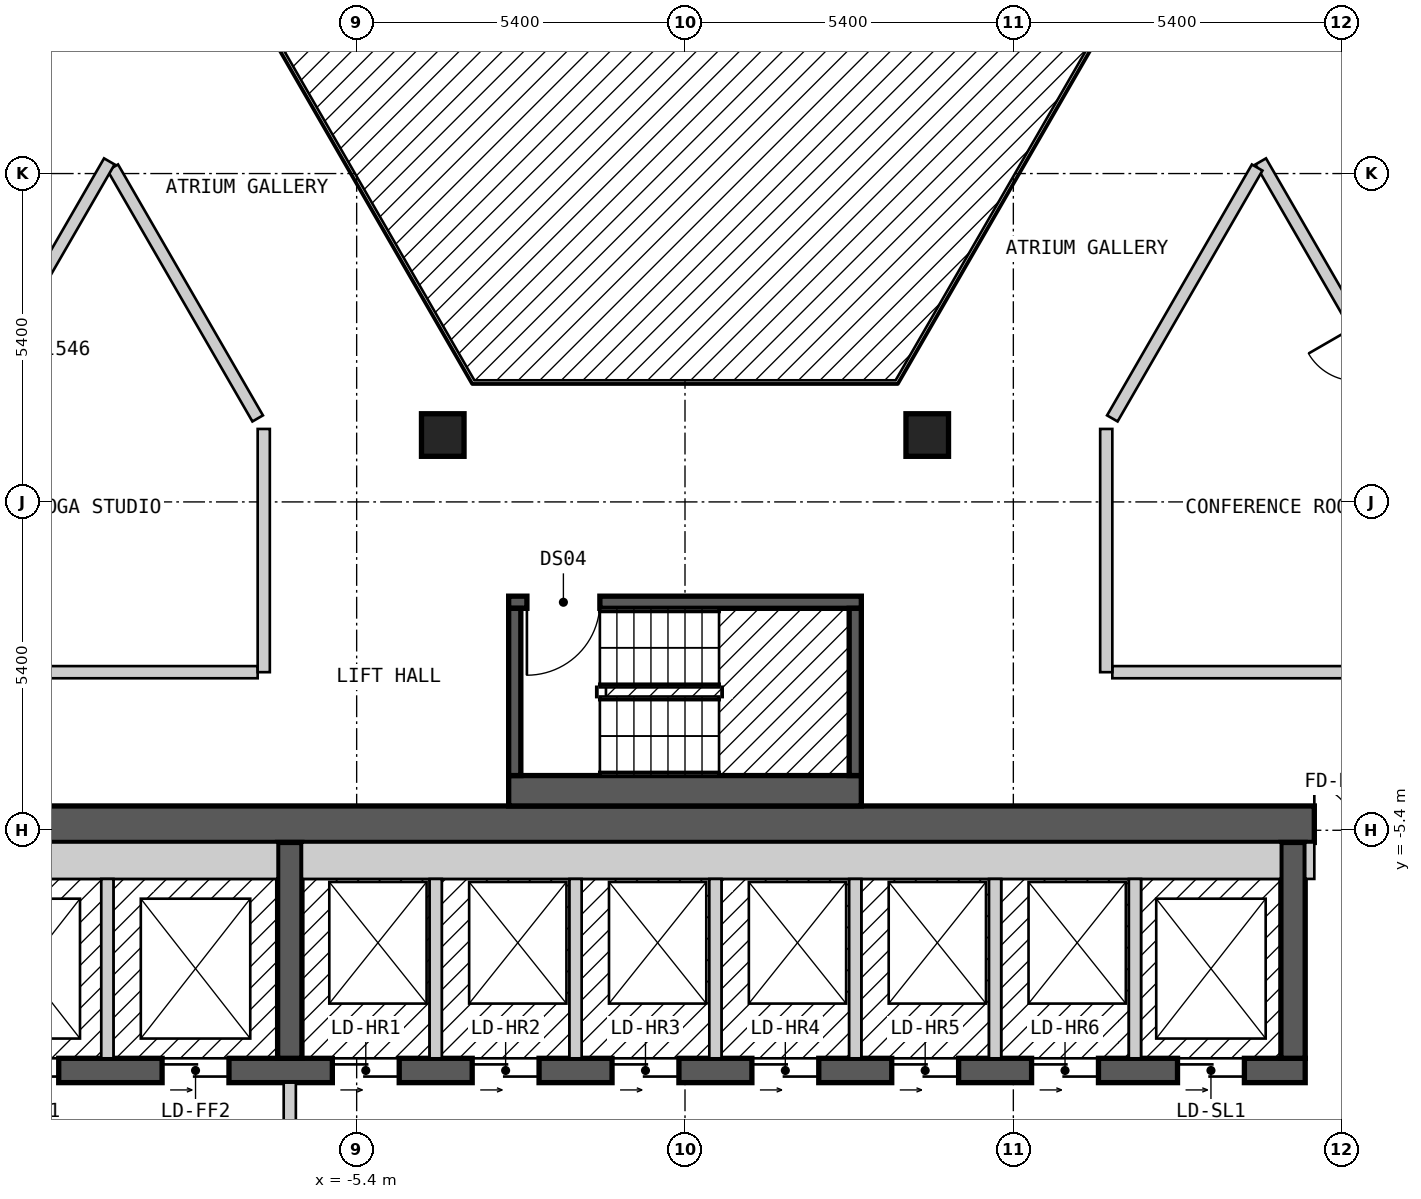
"""IFC4 building model, lengths in metres.
Left out: names, types, materials, properties, quantities, classifications, styles, units other than length and angle.
Written with IfcOpenShell. Run it as: python <this file> out.ifc"""

import sys

from ifc_helpers import new_model, si_unit, direction, frame, frame_2d, origin, origin_2d, place, context, subcontext, project, spatial, rectangle, extrude, element, fill, save


model = new_model("IFC4")
c1 = context("Model", 3, precision=1e-05, world=origin(), true_north=direction((0.0, 1.0)))
c2 = subcontext(c1, "Body", "Model", "MODEL_VIEW")
j1 = project(units=[si_unit("LENGTHUNIT", "METRE"), si_unit("PLANEANGLEUNIT", "RADIAN")], contexts=[c1])
p1 = place(None, origin())
s1 = spatial("IfcSite", under=j1, at=p1, CompositionType="ELEMENT")
p2 = place(p1, origin())
s2 = spatial("IfcBuilding", under=s1, at=p2, CompositionType="ELEMENT")
p3 = place(p2, frame((0.0, 0.0, 190.2)))
s3 = spatial("IfcBuildingStorey", under=s2, at=p3, CompositionType="ELEMENT", Elevation=190.2)
for number, where, z_axis, x_axis in (
    (1, (3.984, 1.1, 0.0), (0.0, 0.0, 1.0), (1.0, 0.0, 0.0)),
    (2, (-3.984, 1.1, 0.0), (0.0, 0.0, 1.0), (1.0, 0.0, 0.0)),
):
    element("IfcColumn", number, at=place(p3, frame(where, z_axis=z_axis, x_axis=x_axis)), inside=s3, PredefinedType="COLUMN", context=c2, shape_type="SweptSolid", body=[
        extrude(rectangle(XDim=0.7, YDim=0.7, at=origin_2d()), origin(), (0.0, 0.0, 1.0), 3.0),
    ])
p4 = place(p3, frame((-13.3, -5.3, 0.0), z_axis=(0.0, 0.0, 1.0), x_axis=(1.0, 0.0, 0.0)))
e3 = element("IfcWall", 3, at=p4, inside=s3, PredefinedType="SHEAR", context=c2, shape_type="SweptSolid", body=[
    extrude(rectangle(XDim=26.6, YDim=0.6, at=frame_2d((13.3, 0.0))), origin(), (0.0, 0.0, 1.0), 2.7),
])
p5 = place(p4, frame((23.65, 0.0, 0.0)))
e4 = element("IfcOpeningElement", 4, at=p5, cuts=e3, PredefinedType="OPENING", context=c2, shape_type="SweptSolid", body=[
    extrude(rectangle(XDim=1.2, YDim=2.1, at=frame_2d((0.6, 1.05))), frame((0.0, 0.31, 0.0), z_axis=(0.0, -1.0, 0.0), x_axis=(1.0, 0.0, 0.0)), (0.0, 0.0, 1.0), 0.62),
])
p6 = place(p3, frame((-12.7, -9.35, 0.0), z_axis=(0.0, 0.0, 1.0), x_axis=(1.0, 0.0, 0.0)))
e5 = element("IfcWall", 5, at=p6, inside=s3, PredefinedType="SHEAR", context=c2, shape_type="SweptSolid", body=[
    extrude(rectangle(XDim=22.9, YDim=0.4, at=frame_2d((11.45, 0.0))), origin(), (0.0, 0.0, 1.0), 2.7),
])
p7 = place(p6, frame((1.3, 0.0, 0.0)))
e6 = element("IfcOpeningElement", 6, at=p7, cuts=e5, PredefinedType="OPENING", context=c2, shape_type="SweptSolid", body=[
    extrude(rectangle(XDim=1.1, YDim=2.1, at=frame_2d((0.55, 1.05))), frame((0.0, 0.21, 0.0), z_axis=(0.0, -1.0, 0.0), x_axis=(1.0, 0.0, 0.0)), (0.0, 0.0, 1.0), 0.42),
])
p8 = place(p6, frame((4.1, 0.0, 0.0)))
e7 = element("IfcOpeningElement", 7, at=p8, cuts=e5, PredefinedType="OPENING", context=c2, shape_type="SweptSolid", body=[
    extrude(rectangle(XDim=1.1, YDim=2.1, at=frame_2d((0.55, 1.05))), frame((0.0, 0.21, 0.0), z_axis=(0.0, -1.0, 0.0), x_axis=(1.0, 0.0, 0.0)), (0.0, 0.0, 1.0), 0.42),
])
p9 = place(p6, frame((6.9, 0.0, 0.0)))
e8 = element("IfcOpeningElement", 8, at=p9, cuts=e5, PredefinedType="OPENING", context=c2, shape_type="SweptSolid", body=[
    extrude(rectangle(XDim=1.1, YDim=2.1, at=frame_2d((0.55, 1.05))), frame((0.0, 0.21, 0.0), z_axis=(0.0, -1.0, 0.0), x_axis=(1.0, 0.0, 0.0)), (0.0, 0.0, 1.0), 0.42),
])
p10 = place(p6, frame((9.2, 0.0, 0.0)))
e9 = element("IfcOpeningElement", 9, at=p10, cuts=e5, PredefinedType="OPENING", context=c2, shape_type="SweptSolid", body=[
    extrude(rectangle(XDim=1.1, YDim=2.1, at=frame_2d((0.55, 1.05))), frame((0.0, 0.21, 0.0), z_axis=(0.0, -1.0, 0.0), x_axis=(1.0, 0.0, 0.0)), (0.0, 0.0, 1.0), 0.42),
])
p11 = place(p6, frame((11.5, 0.0, 0.0)))
e10 = element("IfcOpeningElement", 10, at=p11, cuts=e5, PredefinedType="OPENING", context=c2, shape_type="SweptSolid", body=[
    extrude(rectangle(XDim=1.1, YDim=2.1, at=frame_2d((0.55, 1.05))), frame((0.0, 0.21, 0.0), z_axis=(0.0, -1.0, 0.0), x_axis=(1.0, 0.0, 0.0)), (0.0, 0.0, 1.0), 0.42),
])
p12 = place(p6, frame((13.8, 0.0, 0.0)))
e11 = element("IfcOpeningElement", 11, at=p12, cuts=e5, PredefinedType="OPENING", context=c2, shape_type="SweptSolid", body=[
    extrude(rectangle(XDim=1.1, YDim=2.1, at=frame_2d((0.55, 1.05))), frame((0.0, 0.21, 0.0), z_axis=(0.0, -1.0, 0.0), x_axis=(1.0, 0.0, 0.0)), (0.0, 0.0, 1.0), 0.42),
])
p13 = place(p6, frame((16.1, 0.0, 0.0)))
e12 = element("IfcOpeningElement", 12, at=p13, cuts=e5, PredefinedType="OPENING", context=c2, shape_type="SweptSolid", body=[
    extrude(rectangle(XDim=1.1, YDim=2.1, at=frame_2d((0.55, 1.05))), frame((0.0, 0.21, 0.0), z_axis=(0.0, -1.0, 0.0), x_axis=(1.0, 0.0, 0.0)), (0.0, 0.0, 1.0), 0.42),
])
p14 = place(p6, frame((18.4, 0.0, 0.0)))
e13 = element("IfcOpeningElement", 13, at=p14, cuts=e5, PredefinedType="OPENING", context=c2, shape_type="SweptSolid", body=[
    extrude(rectangle(XDim=1.1, YDim=2.1, at=frame_2d((0.55, 1.05))), frame((0.0, 0.21, 0.0), z_axis=(0.0, -1.0, 0.0), x_axis=(1.0, 0.0, 0.0)), (0.0, 0.0, 1.0), 0.42),
])
p15 = place(p6, frame((20.8, 0.0, 0.0)))
e14 = element("IfcOpeningElement", 14, at=p15, cuts=e5, PredefinedType="OPENING", context=c2, shape_type="SweptSolid", body=[
    extrude(rectangle(XDim=1.1, YDim=2.1, at=frame_2d((0.55, 1.05))), frame((0.0, 0.21, 0.0), z_axis=(0.0, -1.0, 0.0), x_axis=(1.0, 0.0, 0.0)), (0.0, 0.0, 1.0), 0.42),
])
for number, where, z_axis, x_axis in (
    (15, (-6.5, -9.15, 0.0), (0.0, 0.0, 1.0), (0.0, 1.0, 0.0)),
    (16, (10.0, -9.15, 0.0), (0.0, 0.0, 1.0), (0.0, 1.0, 0.0)),
):
    element("IfcWall", number, at=place(p3, frame(where, z_axis=z_axis, x_axis=x_axis)), inside=s3, PredefinedType="SHEAR", context=c2, shape_type="SweptSolid", body=[
        extrude(rectangle(XDim=3.55, YDim=0.4, at=frame_2d((1.775, 0.0))), origin(), (0.0, 0.0, 1.0), 2.7),
    ])
p16 = place(p3, frame((-2.9, -4.75, 0.0), z_axis=(0.0, 0.0, 1.0), x_axis=(1.0, 0.0, 0.0)))
e17 = element("IfcWall", 17, at=p16, inside=s3, PredefinedType="SOLIDWALL", context=c2, shape_type="SweptSolid", body=[
    extrude(rectangle(XDim=5.8, YDim=0.5, at=frame_2d((2.9, 0.0))), origin(), (0.0, 0.0, 1.0), 2.7),
])
p17 = place(p3, frame((-2.9, -1.65, 0.0), z_axis=(0.0, 0.0, 1.0), x_axis=(1.0, 0.0, 0.0)))
e18 = element("IfcWall", 18, at=p17, inside=s3, PredefinedType="SOLIDWALL", context=c2, shape_type="SweptSolid", body=[
    extrude(rectangle(XDim=5.8, YDim=0.2, at=frame_2d((2.9, 0.0))), origin(), (0.0, 0.0, 1.0), 2.7),
])
p18 = place(p17, frame((0.3, 0.0, 0.0)))
e19 = element("IfcOpeningElement", 19, at=p18, cuts=e18, PredefinedType="OPENING", context=c2, shape_type="SweptSolid", body=[
    extrude(rectangle(XDim=1.2, YDim=2.1, at=frame_2d((0.6, 1.05))), frame((0.0, 0.11, 0.0), z_axis=(0.0, -1.0, 0.0), x_axis=(1.0, 0.0, 0.0)), (0.0, 0.0, 1.0), 0.22),
])
for number, where, z_axis, x_axis in (
    (20, (-2.8, -4.5, 0.0), (0.0, 0.0, 1.0), (0.0, 1.0, 0.0)),
    (21, (2.8, -4.5, 0.0), (0.0, 0.0, 1.0), (0.0, 1.0, 0.0)),
):
    element("IfcWall", number, at=place(p3, frame(where, z_axis=z_axis, x_axis=x_axis)), inside=s3, PredefinedType="SOLIDWALL", context=c2, shape_type="SweptSolid", body=[
        extrude(rectangle(XDim=2.75, YDim=0.2, at=frame_2d((1.375, 0.0))), origin(), (0.0, 0.0, 1.0), 2.7),
    ])
p19 = place(p3, frame((-9.411, 5.5, 0.0), z_axis=(0.0, 0.0, 1.0), x_axis=(0.500018099276, -0.86601495391, 0.0)))
e22 = element("IfcWall", 22, at=p19, inside=s3, PredefinedType="PARTITIONING", context=c2, shape_type="SweptSolid", body=[
    extrude(rectangle(XDim=4.765, YDim=0.2, at=frame_2d((2.383, 0.0))), origin(), (0.0, 0.0, 1.0), 2.7),
])
p20 = place(p3, frame((9.469, 5.6, 0.0), z_axis=(0.0, 0.0, 1.0), x_axis=(0.499964524401, -0.866045884662, 0.0)))
e23 = element("IfcWall", 23, at=p20, inside=s3, PredefinedType="PARTITIONING", context=c2, shape_type="SweptSolid", body=[
    extrude(rectangle(XDim=7.042, YDim=0.2, at=frame_2d((3.521, 0.0))), origin(), (0.0, 0.0, 1.0), 2.7),
])
p21 = place(p20, frame((3.129, 0.0, 0.0)))
e24 = element("IfcOpeningElement", 24, at=p21, cuts=e23, PredefinedType="OPENING", context=c2, shape_type="SweptSolid", body=[
    extrude(rectangle(XDim=0.9, YDim=2.1, at=frame_2d((0.45, 1.05))), frame((0.0, 0.11, 0.0), z_axis=(0.0, -1.0, 0.0), x_axis=(1.0, 0.0, 0.0)), (0.0, 0.0, 1.0), 0.22),
])
p22 = place(p3, frame((10.739, 7.8, 0.0), z_axis=(0.0, 0.0, 1.0), x_axis=(0.500023726918, -0.866011704609, 0.0)))
e25 = element("IfcWall", 25, at=p22, inside=s3, PredefinedType="PARTITIONING", context=c2, shape_type="SweptSolid", body=[
    extrude(rectangle(XDim=9.47, YDim=0.2, at=frame_2d((4.735, 0.0))), origin(), (0.0, 0.0, 1.0), 2.7),
])
p23 = place(p22, frame((8.168, 0.0, 0.0)))
e26 = element("IfcOpeningElement", 26, at=p23, cuts=e25, PredefinedType="OPENING", context=c2, shape_type="SweptSolid", body=[
    extrude(rectangle(XDim=1.0, YDim=2.1, at=frame_2d((0.5, 1.05))), frame((0.0, 0.11, 0.0), z_axis=(0.0, -1.0, 0.0), x_axis=(1.0, 0.0, 0.0)), (0.0, 0.0, 1.0), 0.22),
])
p24 = place(p22, frame((3.578, 0.0, 0.0)))
e27 = element("IfcOpeningElement", 27, at=p24, cuts=e25, PredefinedType="OPENING", context=c2, shape_type="SweptSolid", body=[
    extrude(rectangle(XDim=1.0, YDim=2.1, at=frame_2d((0.5, 1.05))), frame((0.0, 0.11, 0.0), z_axis=(0.0, -1.0, 0.0), x_axis=(1.0, 0.0, 0.0)), (0.0, 0.0, 1.0), 0.22),
])
p25 = place(p3, frame((-11.778, -2.8, 0.0), z_axis=(0.0, 0.0, 1.0), x_axis=(1.0, 0.0, 0.0)))
e28 = element("IfcWall", 28, at=p25, inside=s3, PredefinedType="PARTITIONING", context=c2, shape_type="SweptSolid", body=[
    extrude(rectangle(XDim=4.75, YDim=0.2, at=frame_2d((2.375, 0.0))), origin(), (0.0, 0.0, 1.0), 2.7),
])
p26 = place(p3, frame((7.028, -2.8, 0.0), z_axis=(0.0, 0.0, 1.0), x_axis=(1.0, 0.0, 0.0)))
e29 = element("IfcWall", 29, at=p26, inside=s3, PredefinedType="PARTITIONING", context=c2, shape_type="SweptSolid", body=[
    extrude(rectangle(XDim=4.634, YDim=0.2, at=frame_2d((2.317, 0.0))), origin(), (0.0, 0.0, 1.0), 2.7),
])
p27 = place(p3, frame((7.028, 1.373, 0.0), z_axis=(0.0, 0.0, 1.0), x_axis=(0.499953126767, 0.866052464367, 0.0)))
e30 = element("IfcWall", 30, at=p27, inside=s3, PredefinedType="PARTITIONING", context=c2, shape_type="SweptSolid", body=[
    extrude(rectangle(XDim=4.764, YDim=0.2, at=frame_2d((2.382, 0.0))), origin(), (0.0, 0.0, 1.0), 2.7),
])
p28 = place(p3, frame((-13.048, -0.601, 0.0), z_axis=(0.0, 0.0, 1.0), x_axis=(0.499982180423, 0.866035691677, 0.0)))
e31 = element("IfcWall", 31, at=p28, inside=s3, PredefinedType="PARTITIONING", context=c2, shape_type="SweptSolid", body=[
    extrude(rectangle(XDim=7.16, YDim=0.2, at=frame_2d((3.58, 0.0))), origin(), (0.0, 0.0, 1.0), 2.7),
])
p29 = place(p28, frame((3.13, 0.0, 0.0)))
e32 = element("IfcOpeningElement", 32, at=p29, cuts=e31, PredefinedType="OPENING", context=c2, shape_type="SweptSolid", body=[
    extrude(rectangle(XDim=0.9, YDim=2.1, at=frame_2d((0.45, 1.05))), frame((0.0, 0.11, 0.0), z_axis=(0.0, -1.0, 0.0), x_axis=(1.0, 0.0, 0.0)), (0.0, 0.0, 1.0), 0.22),
])
for number, where, z_axis, x_axis in (
    (33, (6.928, -2.8, 0.0), (0.0, 0.0, 1.0), (0.0, 1.0, 0.0)),
    (34, (-6.928, -2.8, 0.0), (0.0, 0.0, 1.0), (0.0, 1.0, 0.0)),
):
    element("IfcWall", number, at=place(p3, frame(where, z_axis=z_axis, x_axis=x_axis)), inside=s3, PredefinedType="PARTITIONING", context=c2, shape_type="SweptSolid", body=[
        extrude(rectangle(XDim=4.0, YDim=0.2, at=frame_2d((2.0, 0.0))), origin(), (0.0, 0.0, 1.0), 2.7),
    ])
p30 = place(p3, frame((-12.1, -5.9, 0.0), z_axis=(0.0, 0.0, 1.0), x_axis=(1.0, 0.0, 0.0)))
e35 = element("IfcWall", 35, at=p30, inside=s3, PredefinedType="SOLIDWALL", context=c2, shape_type="SweptSolid", body=[
    extrude(rectangle(XDim=5.4, YDim=0.6, at=frame_2d((2.7, 0.0))), origin(), (0.0, 0.0, 1.0), 2.7),
])
p31 = place(p3, frame((-9.5, -9.15, 0.0), z_axis=(0.0, 0.0, 1.0), x_axis=(0.0, 1.0, 0.0)))
e36 = element("IfcWall", 36, at=p31, inside=s3, PredefinedType="SOLIDWALL", context=c2, shape_type="SweptSolid", body=[
    extrude(rectangle(XDim=2.95, YDim=0.2, at=frame_2d((1.475, 0.0))), origin(), (0.0, 0.0, 1.0), 2.7),
])
p32 = place(p3, frame((-6.5, -14.45, 0.0), z_axis=(0.0, 0.0, 1.0), x_axis=(0.0, 1.0, 0.0)))
e37 = element("IfcWall", 37, at=p32, inside=s3, PredefinedType="PARTITIONING", context=c2, shape_type="SweptSolid", body=[
    extrude(rectangle(XDim=4.9, YDim=0.2, at=frame_2d((2.45, 0.0))), origin(), (0.0, 0.0, 1.0), 2.7),
])
p33 = place(p32, frame((3.15, 0.0, 0.0), z_axis=(0.0, 0.0, 1.0), x_axis=(-1.0, 0.0, 0.0)))
e38 = element("IfcOpeningElement", 38, at=p33, cuts=e37, PredefinedType="OPENING", context=c2, shape_type="SweptSolid", body=[
    extrude(rectangle(XDim=1.4, YDim=2.1, at=frame_2d((0.7, 1.05))), frame((0.0, 0.11, 0.0), z_axis=(0.0, -1.0, 0.0), x_axis=(1.0, 0.0, 0.0)), (0.0, 0.0, 1.0), 0.22),
])
p34 = place(p3, frame((-6.3, -5.9, 0.0), z_axis=(0.0, 0.0, 1.0), x_axis=(1.0, 0.0, 0.0)))
e39 = element("IfcWall", 39, at=p34, inside=s3, PredefinedType="SOLIDWALL", context=c2, shape_type="SweptSolid", body=[
    extrude(rectangle(XDim=16.1, YDim=0.6, at=frame_2d((8.05, 0.0))), origin(), (0.0, 0.0, 1.0), 2.7),
])
for number, where, z_axis, x_axis in (
    (40, (-4.1, -9.15, 0.0), (0.0, 0.0, 1.0), (0.0, 1.0, 0.0)),
    (41, (-1.8, -9.15, 0.0), (0.0, 0.0, 1.0), (0.0, 1.0, 0.0)),
    (42, (0.5, -9.15, 0.0), (0.0, 0.0, 1.0), (0.0, 1.0, 0.0)),
    (43, (2.8, -9.15, 0.0), (0.0, 0.0, 1.0), (0.0, 1.0, 0.0)),
    (44, (5.1, -9.15, 0.0), (0.0, 0.0, 1.0), (0.0, 1.0, 0.0)),
    (45, (7.4, -9.15, 0.0), (0.0, 0.0, 1.0), (0.0, 1.0, 0.0)),
):
    element("IfcWall", number, at=place(p3, frame(where, z_axis=z_axis, x_axis=x_axis)), inside=s3, PredefinedType="SOLIDWALL", context=c2, shape_type="SweptSolid", body=[
        extrude(rectangle(XDim=2.95, YDim=0.2, at=frame_2d((1.475, 0.0))), origin(), (0.0, 0.0, 1.0), 2.7),
    ])
p35 = place(p3, frame((10.275, -6.2, 0.0), z_axis=(0.0, 0.0, 1.0), x_axis=(0.0, 1.0, 0.0)))
e46 = element("IfcWall", 46, at=p35, inside=s3, PredefinedType="PARTITIONING", context=c2, shape_type="SweptSolid", body=[
    extrude(rectangle(XDim=0.6, YDim=0.15, at=frame_2d((0.3, 0.0))), origin(), (0.0, 0.0, 1.0), 2.7),
])
p36 = place(p18, origin())
e47 = element("IfcDoor", 47, at=p36, inside=s3, OperationType="SINGLE_SWING_LEFT", PredefinedType="DOOR", context=c2, shape_type="SweptSolid", body=[
    extrude(rectangle(XDim=1.2, YDim=2.1, at=frame_2d((0.6, 1.05))), frame((0.0, 0.025, 0.0), z_axis=(0.0, -1.0, 0.0), x_axis=(1.0, 0.0, 0.0)), (0.0, 0.0, 1.0), 0.05),
])
fill(e19, e47)
p37 = place(p7, origin())
e48 = element("IfcDoor", 48, at=p37, inside=s3, OperationType="DOUBLE_DOOR_SLIDING", PredefinedType="DOOR", context=c2, shape_type="SweptSolid", body=[
    extrude(rectangle(XDim=1.1, YDim=2.1, at=frame_2d((0.55, 1.05))), frame((0.0, 0.025, 0.0), z_axis=(0.0, -1.0, 0.0), x_axis=(1.0, 0.0, 0.0)), (0.0, 0.0, 1.0), 0.05),
])
fill(e6, e48)
p38 = place(p8, origin())
e49 = element("IfcDoor", 49, at=p38, inside=s3, OperationType="DOUBLE_DOOR_SLIDING", PredefinedType="DOOR", context=c2, shape_type="SweptSolid", body=[
    extrude(rectangle(XDim=1.1, YDim=2.1, at=frame_2d((0.55, 1.05))), frame((0.0, 0.025, 0.0), z_axis=(0.0, -1.0, 0.0), x_axis=(1.0, 0.0, 0.0)), (0.0, 0.0, 1.0), 0.05),
])
fill(e7, e49)
p39 = place(p9, origin())
e50 = element("IfcDoor", 50, at=p39, inside=s3, OperationType="DOUBLE_DOOR_SLIDING", PredefinedType="DOOR", context=c2, shape_type="SweptSolid", body=[
    extrude(rectangle(XDim=1.1, YDim=2.1, at=frame_2d((0.55, 1.05))), frame((0.0, 0.025, 0.0), z_axis=(0.0, -1.0, 0.0), x_axis=(1.0, 0.0, 0.0)), (0.0, 0.0, 1.0), 0.05),
])
fill(e8, e50)
p40 = place(p10, origin())
e51 = element("IfcDoor", 51, at=p40, inside=s3, OperationType="DOUBLE_DOOR_SLIDING", PredefinedType="DOOR", context=c2, shape_type="SweptSolid", body=[
    extrude(rectangle(XDim=1.1, YDim=2.1, at=frame_2d((0.55, 1.05))), frame((0.0, 0.025, 0.0), z_axis=(0.0, -1.0, 0.0), x_axis=(1.0, 0.0, 0.0)), (0.0, 0.0, 1.0), 0.05),
])
fill(e9, e51)
p41 = place(p11, origin())
e52 = element("IfcDoor", 52, at=p41, inside=s3, OperationType="DOUBLE_DOOR_SLIDING", PredefinedType="DOOR", context=c2, shape_type="SweptSolid", body=[
    extrude(rectangle(XDim=1.1, YDim=2.1, at=frame_2d((0.55, 1.05))), frame((0.0, 0.025, 0.0), z_axis=(0.0, -1.0, 0.0), x_axis=(1.0, 0.0, 0.0)), (0.0, 0.0, 1.0), 0.05),
])
fill(e10, e52)
p42 = place(p12, origin())
e53 = element("IfcDoor", 53, at=p42, inside=s3, OperationType="DOUBLE_DOOR_SLIDING", PredefinedType="DOOR", context=c2, shape_type="SweptSolid", body=[
    extrude(rectangle(XDim=1.1, YDim=2.1, at=frame_2d((0.55, 1.05))), frame((0.0, 0.025, 0.0), z_axis=(0.0, -1.0, 0.0), x_axis=(1.0, 0.0, 0.0)), (0.0, 0.0, 1.0), 0.05),
])
fill(e11, e53)
p43 = place(p13, origin())
e54 = element("IfcDoor", 54, at=p43, inside=s3, OperationType="DOUBLE_DOOR_SLIDING", PredefinedType="DOOR", context=c2, shape_type="SweptSolid", body=[
    extrude(rectangle(XDim=1.1, YDim=2.1, at=frame_2d((0.55, 1.05))), frame((0.0, 0.025, 0.0), z_axis=(0.0, -1.0, 0.0), x_axis=(1.0, 0.0, 0.0)), (0.0, 0.0, 1.0), 0.05),
])
fill(e12, e54)
p44 = place(p14, origin())
e55 = element("IfcDoor", 55, at=p44, inside=s3, OperationType="DOUBLE_DOOR_SLIDING", PredefinedType="DOOR", context=c2, shape_type="SweptSolid", body=[
    extrude(rectangle(XDim=1.1, YDim=2.1, at=frame_2d((0.55, 1.05))), frame((0.0, 0.025, 0.0), z_axis=(0.0, -1.0, 0.0), x_axis=(1.0, 0.0, 0.0)), (0.0, 0.0, 1.0), 0.05),
])
fill(e13, e55)
p45 = place(p15, origin())
e56 = element("IfcDoor", 56, at=p45, inside=s3, OperationType="DOUBLE_DOOR_SLIDING", PredefinedType="DOOR", context=c2, shape_type="SweptSolid", body=[
    extrude(rectangle(XDim=1.1, YDim=2.1, at=frame_2d((0.55, 1.05))), frame((0.0, 0.025, 0.0), z_axis=(0.0, -1.0, 0.0), x_axis=(1.0, 0.0, 0.0)), (0.0, 0.0, 1.0), 0.05),
])
fill(e14, e56)
p46 = place(p5, origin())
e57 = element("IfcDoor", 57, at=p46, inside=s3, OperationType="DOUBLE_DOOR_SINGLE_SWING", PredefinedType="DOOR", context=c2, shape_type="SweptSolid", body=[
    extrude(rectangle(XDim=1.2, YDim=2.1, at=frame_2d((0.6, 1.05))), frame((0.0, 0.025, 0.0), z_axis=(0.0, -1.0, 0.0), x_axis=(1.0, 0.0, 0.0)), (0.0, 0.0, 1.0), 0.05),
])
fill(e4, e57)
save(model, sys.argv[1])
